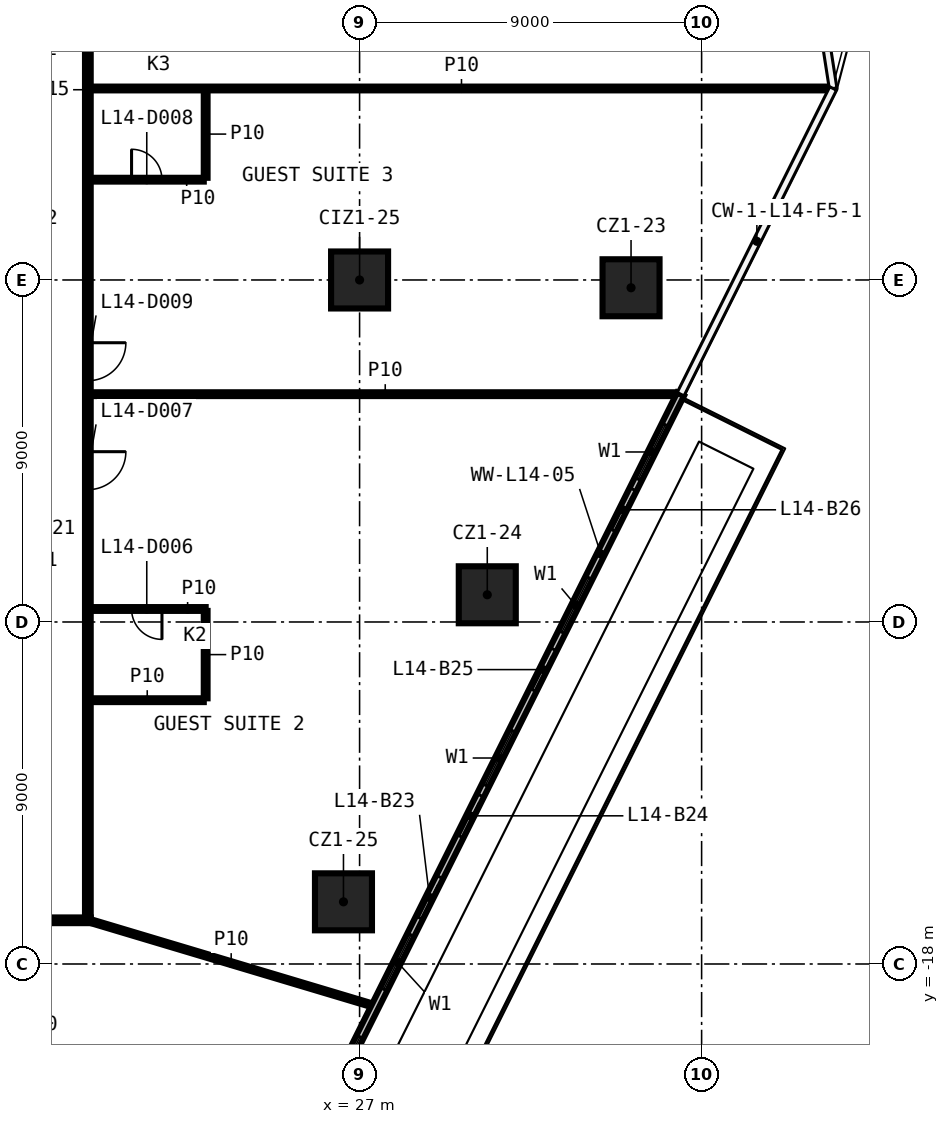
"""IFC4 building model, lengths in metres.
Left out: names, types, materials, properties, quantities, classifications, styles, units other than length and angle.
Written with IfcOpenShell. Run it as: python <this file> out.ifc"""

import sys

from ifc_helpers import new_model, si_unit, direction, frame, frame_2d, origin, origin_2d, place, context, subcontext, project, spatial, rectangle, extrude, element, fill, save


model = new_model("IFC4")
c1 = context("Model", 3, precision=1e-05, world=origin(), true_north=direction((0.0, 1.0)))
c2 = subcontext(c1, "Body", "Model", "MODEL_VIEW")
j1 = project(units=[si_unit("LENGTHUNIT", "METRE"), si_unit("PLANEANGLEUNIT", "RADIAN")], contexts=[c1])
p1 = place(None, origin())
s1 = spatial("IfcSite", under=j1, at=p1, CompositionType="ELEMENT")
p2 = place(p1, origin())
s2 = spatial("IfcBuilding", under=s1, at=p2, CompositionType="ELEMENT")
p3 = place(p2, frame((0.0, 0.0, 73.6)))
s3 = spatial("IfcBuildingStorey", under=s2, at=p3, CompositionType="ELEMENT", Elevation=73.6)
for number, where, z_axis, x_axis in (
    (1, (34.143, -0.205, 0.0), (0.0, 0.0, 1.0), (1.0, 0.0, 0.0)),
    (2, (30.36, -8.284, 0.0), (0.0, 0.0, 1.0), (1.0, 0.0, 0.0)),
    (3, (26.576, -16.364, 0.0), (0.0, 0.0, 1.0), (1.0, 0.0, 0.0)),
    (4, (27.0, 0.0, 0.0), (0.0, 0.0, 1.0), (1.0, 0.0, 0.0)),
):
    element("IfcColumn", number, at=place(p3, frame(where, z_axis=z_axis, x_axis=x_axis)), inside=s3, PredefinedType="COLUMN", context=c2, shape_type="SweptSolid", body=[
        extrude(rectangle(XDim=1.5, YDim=1.5, at=origin_2d()), origin(), (0.0, 0.0, 1.0), 3.3),
    ])
p4 = place(p3, frame((19.925, -16.85, 0.0), z_axis=(0.0, 0.0, 1.0), x_axis=(-1.0, 0.0, 0.0)))
e5 = element("IfcWall", 5, at=p4, inside=s3, PredefinedType="PARTITIONING", context=c2, shape_type="SweptSolid", body=[
    extrude(rectangle(XDim=39.85, YDim=0.15, at=frame_2d((19.925, 0.0))), origin(), (0.0, 0.0, 1.0), 3.3),
])
p5 = place(p4, frame((30.959, 0.0, 0.0)))
e6 = element("IfcOpeningElement", 6, at=p5, cuts=e5, PredefinedType="OPENING", context=c2, shape_type="SweptSolid", body=[
    extrude(rectangle(XDim=0.9, YDim=2.1, at=frame_2d((0.45, 1.05))), frame((0.0, 0.085, 0.0), z_axis=(0.0, -1.0, 0.0), x_axis=(1.0, 0.0, 0.0)), (0.0, 0.0, 1.0), 0.17),
])
p6 = place(p4, frame((22.077, 0.0, 0.0)))
e7 = element("IfcOpeningElement", 7, at=p6, cuts=e5, PredefinedType="OPENING", context=c2, shape_type="SweptSolid", body=[
    extrude(rectangle(XDim=0.9, YDim=2.1, at=frame_2d((0.45, 1.05))), frame((0.0, 0.085, 0.0), z_axis=(0.0, -1.0, 0.0), x_axis=(1.0, 0.0, 0.0)), (0.0, 0.0, 1.0), 0.17),
])
p7 = place(p3, frame((19.925, -11.058, 0.0), z_axis=(0.0, 0.0, 1.0), x_axis=(1.0, 0.0, 0.0)))
e8 = element("IfcWall", 8, at=p7, inside=s3, PredefinedType="PARTITIONING", context=c2, shape_type="SweptSolid", body=[
    extrude(rectangle(XDim=2.975, YDim=0.1, at=frame_2d((1.487, 0.0))), origin(), (0.0, 0.0, 1.0), 3.3),
])
p8 = place(p3, frame((22.95, -8.658, 0.0), z_axis=(0.0, 0.0, 1.0), x_axis=(-1.0, 0.0, 0.0)))
e9 = element("IfcWall", 9, at=p8, inside=s3, PredefinedType="PARTITIONING", context=c2, shape_type="SweptSolid", body=[
    extrude(rectangle(XDim=3.025, YDim=0.1, at=frame_2d((1.512, 0.0))), origin(), (0.0, 0.0, 1.0), 3.3),
])
p9 = place(p8, frame((1.15, 0.0, 0.0)))
e10 = element("IfcOpeningElement", 10, at=p9, cuts=e9, PredefinedType="OPENING", context=c2, shape_type="SweptSolid", body=[
    extrude(rectangle(XDim=0.8, YDim=2.1, at=frame_2d((0.4, 1.05))), frame((0.0, 0.06, 0.0), z_axis=(0.0, -1.0, 0.0), x_axis=(1.0, 0.0, 0.0)), (0.0, 0.0, 1.0), 0.12),
])
p10 = place(p3, frame((19.925, -3.005, 0.0), z_axis=(0.0, 0.0, 1.0), x_axis=(1.0, 0.0, 0.0)))
e11 = element("IfcWall", 11, at=p10, inside=s3, PredefinedType="PARTITIONING", context=c2, shape_type="SweptSolid", body=[
    extrude(rectangle(XDim=15.5, YDim=0.1, at=frame_2d((7.75, 0.0))), origin(), (0.0, 0.0, 1.0), 3.3),
])
p11 = place(p3, frame((19.925, 2.639, 0.0), z_axis=(0.0, 0.0, 1.0), x_axis=(1.0, 0.0, 0.0)))
e12 = element("IfcWall", 12, at=p11, inside=s3, PredefinedType="PARTITIONING", context=c2, shape_type="SweptSolid", body=[
    extrude(rectangle(XDim=2.975, YDim=0.1, at=frame_2d((1.487, 0.0))), origin(), (0.0, 0.0, 1.0), 3.3),
])
p12 = place(p11, frame((1.075, 0.0, 0.0)))
e13 = element("IfcOpeningElement", 13, at=p12, cuts=e12, PredefinedType="OPENING", context=c2, shape_type="SweptSolid", body=[
    extrude(rectangle(XDim=0.8, YDim=2.1, at=frame_2d((0.4, 1.05))), frame((0.0, 0.06, 0.0), z_axis=(0.0, -1.0, 0.0), x_axis=(1.0, 0.0, 0.0)), (0.0, 0.0, 1.0), 0.12),
])
p13 = place(p3, frame((19.925, 5.039, 0.0), z_axis=(0.0, 0.0, 1.0), x_axis=(1.0, 0.0, 0.0)))
e14 = element("IfcWall", 14, at=p13, inside=s3, PredefinedType="PARTITIONING", context=c2, shape_type="SweptSolid", body=[
    extrude(rectangle(XDim=19.513, YDim=0.1, at=frame_2d((9.757, 0.0))), origin(), (0.0, 0.0, 1.0), 3.3),
])
for number, where, z_axis, x_axis in (
    (15, (22.95, -11.009, 0.0), (0.0, 0.0, 1.0), (0.0, 1.0, 0.0)),
    (16, (22.95, 2.689, 0.0), (0.0, 0.0, 1.0), (0.0, 1.0, 0.0)),
):
    element("IfcWall", number, at=place(p3, frame(where, z_axis=z_axis, x_axis=x_axis)), inside=s3, PredefinedType="PARTITIONING", context=c2, shape_type="SweptSolid", body=[
        extrude(rectangle(XDim=2.3, YDim=0.1, at=frame_2d((1.15, 0.0))), origin(), (0.0, 0.0, 1.0), 3.3),
    ])
p14 = place(p3, frame((19.85, 16.775, 0.0), z_axis=(0.0, 0.0, 1.0), x_axis=(0.0, -1.0, 0.0)))
e17 = element("IfcWall", 17, at=p14, inside=s3, PredefinedType="PARTITIONING", context=c2, shape_type="SweptSolid", body=[
    extrude(rectangle(XDim=33.55, YDim=0.15, at=frame_2d((16.775, 0.0))), origin(), (0.0, 0.0, 1.0), 3.3),
])
p15 = place(p14, frame((21.293, 0.0, 0.0)))
e18 = element("IfcOpeningElement", 18, at=p15, cuts=e17, PredefinedType="OPENING", context=c2, shape_type="SweptSolid", body=[
    extrude(rectangle(XDim=1.0, YDim=2.1, at=frame_2d((0.5, 1.05))), frame((0.0, 0.085, 0.0), z_axis=(0.0, -1.0, 0.0), x_axis=(1.0, 0.0, 0.0)), (0.0, 0.0, 1.0), 0.17),
])
p16 = place(p14, frame((18.427, 0.0, 0.0)))
e19 = element("IfcOpeningElement", 19, at=p16, cuts=e17, PredefinedType="OPENING", context=c2, shape_type="SweptSolid", body=[
    extrude(rectangle(XDim=1.0, YDim=2.1, at=frame_2d((0.5, 1.05))), frame((0.0, 0.085, 0.0), z_axis=(0.0, -1.0, 0.0), x_axis=(1.0, 0.0, 0.0)), (0.0, 0.0, 1.0), 0.17),
])
p17 = place(p14, frame((4.211, 0.0, 0.0)))
e20 = element("IfcOpeningElement", 20, at=p17, cuts=e17, PredefinedType="OPENING", context=c2, shape_type="SweptSolid", body=[
    extrude(rectangle(XDim=0.9, YDim=2.1, at=frame_2d((0.45, 1.05))), frame((0.0, 0.085, 0.0), z_axis=(0.0, -1.0, 0.0), x_axis=(1.0, 0.0, 0.0)), (0.0, 0.0, 1.0), 0.17),
])
p18 = place(p3, frame((19.85, -16.85, 0.0), z_axis=(0.0, 0.0, 1.0), x_axis=(0.958075156501, -0.286517005597, 0.0)))
e21 = element("IfcWall", 21, at=p18, inside=s3, PredefinedType="PARTITIONING", context=c2, shape_type="SweptSolid", body=[
    extrude(rectangle(XDim=7.873, YDim=0.1, at=frame_2d((3.936, 0.0))), origin(), (0.0, 0.0, 1.0), 3.3),
])
p19 = place(p3, frame((23.394, -27.165, 0.0), z_axis=(0.0, 0.0, 1.0), x_axis=(0.446421309396, 0.894822895615, 0.0)))
e22 = element("IfcWall", 22, at=p19, inside=s3, PredefinedType="SOLIDWALL", context=c2, shape_type="SweptSolid", body=[
    extrude(rectangle(XDim=27.0, YDim=0.2, at=frame_2d((13.5, 0.0))), origin(), (0.0, 0.0, 1.0), 3.3),
])
p20 = place(p19, frame((0.5, 0.0, 0.6)))
e23 = element("IfcOpeningElement", 23, at=p20, cuts=e22, PredefinedType="OPENING", context=c2, shape_type="SweptSolid", body=[
    extrude(rectangle(XDim=1.6, YDim=2.4, at=frame_2d((0.8, 1.2))), frame((0.0, 0.11, 0.0), z_axis=(0.0, -1.0, 0.0), x_axis=(1.0, 0.0, 0.0)), (0.0, 0.0, 1.0), 0.22),
])
p21 = place(p19, frame((3.0, 0.0, 0.0)))
e24 = element("IfcOpeningElement", 24, at=p21, cuts=e22, PredefinedType="OPENING", context=c2, shape_type="SweptSolid", body=[
    extrude(rectangle(XDim=1.2, YDim=2.4, at=frame_2d((0.6, 1.2))), frame((0.0, 0.11, 0.0), z_axis=(0.0, -1.0, 0.0), x_axis=(1.0, 0.0, 0.0)), (0.0, 0.0, 1.0), 0.22),
])
p22 = place(p19, frame((6.5, 0.0, 0.6)))
e25 = element("IfcOpeningElement", 25, at=p22, cuts=e22, PredefinedType="OPENING", context=c2, shape_type="SweptSolid", body=[
    extrude(rectangle(XDim=1.6, YDim=2.4, at=frame_2d((0.8, 1.2))), frame((0.0, 0.11, 0.0), z_axis=(0.0, -1.0, 0.0), x_axis=(1.0, 0.0, 0.0)), (0.0, 0.0, 1.0), 0.22),
])
p23 = place(p19, frame((5.0, 0.0, 0.0)))
e26 = element("IfcOpeningElement", 26, at=p23, cuts=e22, PredefinedType="OPENING", context=c2, shape_type="SweptSolid", body=[
    extrude(rectangle(XDim=1.2, YDim=2.4, at=frame_2d((0.6, 1.2))), frame((0.0, 0.11, 0.0), z_axis=(0.0, -1.0, 0.0), x_axis=(1.0, 0.0, 0.0)), (0.0, 0.0, 1.0), 0.22),
])
p24 = place(p19, frame((9.5, 0.0, 0.6)))
e27 = element("IfcOpeningElement", 27, at=p24, cuts=e22, PredefinedType="OPENING", context=c2, shape_type="SweptSolid", body=[
    extrude(rectangle(XDim=1.6, YDim=2.4, at=frame_2d((0.8, 1.2))), frame((0.0, 0.11, 0.0), z_axis=(0.0, -1.0, 0.0), x_axis=(1.0, 0.0, 0.0)), (0.0, 0.0, 1.0), 0.22),
])
p25 = place(p19, frame((11.6, 0.0, 0.0)))
e28 = element("IfcOpeningElement", 28, at=p25, cuts=e22, PredefinedType="OPENING", context=c2, shape_type="SweptSolid", body=[
    extrude(rectangle(XDim=1.2, YDim=2.4, at=frame_2d((0.6, 1.2))), frame((0.0, 0.11, 0.0), z_axis=(0.0, -1.0, 0.0), x_axis=(1.0, 0.0, 0.0)), (0.0, 0.0, 1.0), 0.22),
])
p26 = place(p19, frame((15.5, 0.0, 0.6)))
e29 = element("IfcOpeningElement", 29, at=p26, cuts=e22, PredefinedType="OPENING", context=c2, shape_type="SweptSolid", body=[
    extrude(rectangle(XDim=1.6, YDim=2.4, at=frame_2d((0.8, 1.2))), frame((0.0, 0.11, 0.0), z_axis=(0.0, -1.0, 0.0), x_axis=(1.0, 0.0, 0.0)), (0.0, 0.0, 1.0), 0.22),
])
p27 = place(p19, frame((14.0, 0.0, 0.0)))
e30 = element("IfcOpeningElement", 30, at=p27, cuts=e22, PredefinedType="OPENING", context=c2, shape_type="SweptSolid", body=[
    extrude(rectangle(XDim=1.2, YDim=2.4, at=frame_2d((0.6, 1.2))), frame((0.0, 0.11, 0.0), z_axis=(0.0, -1.0, 0.0), x_axis=(1.0, 0.0, 0.0)), (0.0, 0.0, 1.0), 0.22),
])
p28 = place(p19, frame((20.0, 0.0, 0.6)))
e31 = element("IfcOpeningElement", 31, at=p28, cuts=e22, PredefinedType="OPENING", context=c2, shape_type="SweptSolid", body=[
    extrude(rectangle(XDim=1.6, YDim=2.4, at=frame_2d((0.8, 1.2))), frame((0.0, 0.11, 0.0), z_axis=(0.0, -1.0, 0.0), x_axis=(1.0, 0.0, 0.0)), (0.0, 0.0, 1.0), 0.22),
])
p29 = place(p19, frame((18.3, 0.0, 0.0)))
e32 = element("IfcOpeningElement", 32, at=p29, cuts=e22, PredefinedType="OPENING", context=c2, shape_type="SweptSolid", body=[
    extrude(rectangle(XDim=1.2, YDim=2.4, at=frame_2d((0.6, 1.2))), frame((0.0, 0.11, 0.0), z_axis=(0.0, -1.0, 0.0), x_axis=(1.0, 0.0, 0.0)), (0.0, 0.0, 1.0), 0.22),
])
p30 = place(p19, frame((24.5, 0.0, 0.6)))
e33 = element("IfcOpeningElement", 33, at=p30, cuts=e22, PredefinedType="OPENING", context=c2, shape_type="SweptSolid", body=[
    extrude(rectangle(XDim=1.6, YDim=2.4, at=frame_2d((0.8, 1.2))), frame((0.0, 0.11, 0.0), z_axis=(0.0, -1.0, 0.0), x_axis=(1.0, 0.0, 0.0)), (0.0, 0.0, 1.0), 0.22),
])
p31 = place(p19, frame((23.0, 0.0, 0.0)))
e34 = element("IfcOpeningElement", 34, at=p31, cuts=e22, PredefinedType="OPENING", context=c2, shape_type="SweptSolid", body=[
    extrude(rectangle(XDim=1.2, YDim=2.4, at=frame_2d((0.6, 1.2))), frame((0.0, 0.11, 0.0), z_axis=(0.0, -1.0, 0.0), x_axis=(1.0, 0.0, 0.0)), (0.0, 0.0, 1.0), 0.22),
])
p32 = place(p9, origin())
e35 = element("IfcDoor", 35, at=p32, inside=s3, OperationType="SINGLE_SWING_LEFT", PredefinedType="DOOR", context=c2, shape_type="SweptSolid", body=[
    extrude(rectangle(XDim=0.8, YDim=2.1, at=frame_2d((0.4, 1.05))), frame((0.0, 0.025, 0.0), z_axis=(0.0, -1.0, 0.0), x_axis=(1.0, 0.0, 0.0)), (0.0, 0.0, 1.0), 0.05),
])
fill(e10, e35)
p33 = place(p15, origin())
e36 = element("IfcDoor", 36, at=p33, inside=s3, OperationType="SINGLE_SWING_RIGHT", PredefinedType="DOOR", context=c2, shape_type="SweptSolid", body=[
    extrude(rectangle(XDim=1.0, YDim=2.1, at=frame_2d((0.5, 1.05))), frame((0.0, 0.025, 0.0), z_axis=(0.0, -1.0, 0.0), x_axis=(1.0, 0.0, 0.0)), (0.0, 0.0, 1.0), 0.05),
])
fill(e18, e36)
p34 = place(p12, origin())
e37 = element("IfcDoor", 37, at=p34, inside=s3, OperationType="SINGLE_SWING_RIGHT", PredefinedType="DOOR", context=c2, shape_type="SweptSolid", body=[
    extrude(rectangle(XDim=0.8, YDim=2.1, at=frame_2d((0.4, 1.05))), frame((0.0, 0.025, 0.0), z_axis=(0.0, -1.0, 0.0), x_axis=(1.0, 0.0, 0.0)), (0.0, 0.0, 1.0), 0.05),
])
fill(e13, e37)
p35 = place(p16, origin())
e38 = element("IfcDoor", 38, at=p35, inside=s3, OperationType="SINGLE_SWING_LEFT", PredefinedType="DOOR", context=c2, shape_type="SweptSolid", body=[
    extrude(rectangle(XDim=1.0, YDim=2.1, at=frame_2d((0.5, 1.05))), frame((0.0, 0.025, 0.0), z_axis=(0.0, -1.0, 0.0), x_axis=(1.0, 0.0, 0.0)), (0.0, 0.0, 1.0), 0.05),
])
fill(e19, e38)
p36 = place(p22, origin())
e39 = element("IfcWindow", 39, at=p36, inside=s3, PartitioningType="SINGLE_PANEL", PredefinedType="WINDOW", context=c2, shape_type="SweptSolid", body=[
    extrude(rectangle(XDim=1.6, YDim=2.4, at=frame_2d((0.8, 1.2))), frame((0.0, 0.03, 0.0), z_axis=(0.0, -1.0, 0.0), x_axis=(1.0, 0.0, 0.0)), (0.0, 0.0, 1.0), 0.06),
])
fill(e25, e39)
p37 = place(p24, origin())
e40 = element("IfcWindow", 40, at=p37, inside=s3, PartitioningType="SINGLE_PANEL", PredefinedType="WINDOW", context=c2, shape_type="SweptSolid", body=[
    extrude(rectangle(XDim=1.6, YDim=2.4, at=frame_2d((0.8, 1.2))), frame((0.0, 0.03, 0.0), z_axis=(0.0, -1.0, 0.0), x_axis=(1.0, 0.0, 0.0)), (0.0, 0.0, 1.0), 0.06),
])
fill(e27, e40)
p38 = place(p25, origin())
e41 = element("IfcDoor", 41, at=p38, inside=s3, OperationType="SLIDING_TO_LEFT", PredefinedType="DOOR", context=c2, shape_type="SweptSolid", body=[
    extrude(rectangle(XDim=1.2, YDim=2.4, at=frame_2d((0.6, 1.2))), frame((0.0, 0.025, 0.0), z_axis=(0.0, -1.0, 0.0), x_axis=(1.0, 0.0, 0.0)), (0.0, 0.0, 1.0), 0.05),
])
fill(e28, e41)
p39 = place(p26, origin())
e42 = element("IfcWindow", 42, at=p39, inside=s3, PartitioningType="SINGLE_PANEL", PredefinedType="WINDOW", context=c2, shape_type="SweptSolid", body=[
    extrude(rectangle(XDim=1.6, YDim=2.4, at=frame_2d((0.8, 1.2))), frame((0.0, 0.03, 0.0), z_axis=(0.0, -1.0, 0.0), x_axis=(1.0, 0.0, 0.0)), (0.0, 0.0, 1.0), 0.06),
])
fill(e29, e42)
p40 = place(p27, origin())
e43 = element("IfcDoor", 43, at=p40, inside=s3, OperationType="SLIDING_TO_LEFT", PredefinedType="DOOR", context=c2, shape_type="SweptSolid", body=[
    extrude(rectangle(XDim=1.2, YDim=2.4, at=frame_2d((0.6, 1.2))), frame((0.0, 0.025, 0.0), z_axis=(0.0, -1.0, 0.0), x_axis=(1.0, 0.0, 0.0)), (0.0, 0.0, 1.0), 0.05),
])
fill(e30, e43)
p41 = place(p28, origin())
e44 = element("IfcWindow", 44, at=p41, inside=s3, PartitioningType="SINGLE_PANEL", PredefinedType="WINDOW", context=c2, shape_type="SweptSolid", body=[
    extrude(rectangle(XDim=1.6, YDim=2.4, at=frame_2d((0.8, 1.2))), frame((0.0, 0.03, 0.0), z_axis=(0.0, -1.0, 0.0), x_axis=(1.0, 0.0, 0.0)), (0.0, 0.0, 1.0), 0.06),
])
fill(e31, e44)
p42 = place(p29, origin())
e45 = element("IfcDoor", 45, at=p42, inside=s3, OperationType="SLIDING_TO_LEFT", PredefinedType="DOOR", context=c2, shape_type="SweptSolid", body=[
    extrude(rectangle(XDim=1.2, YDim=2.4, at=frame_2d((0.6, 1.2))), frame((0.0, 0.025, 0.0), z_axis=(0.0, -1.0, 0.0), x_axis=(1.0, 0.0, 0.0)), (0.0, 0.0, 1.0), 0.05),
])
fill(e32, e45)
p43 = place(p30, origin())
e46 = element("IfcWindow", 46, at=p43, inside=s3, PartitioningType="SINGLE_PANEL", PredefinedType="WINDOW", context=c2, shape_type="SweptSolid", body=[
    extrude(rectangle(XDim=1.6, YDim=2.4, at=frame_2d((0.8, 1.2))), frame((0.0, 0.03, 0.0), z_axis=(0.0, -1.0, 0.0), x_axis=(1.0, 0.0, 0.0)), (0.0, 0.0, 1.0), 0.06),
])
fill(e33, e46)
p44 = place(p31, origin())
e47 = element("IfcDoor", 47, at=p44, inside=s3, OperationType="SLIDING_TO_LEFT", PredefinedType="DOOR", context=c2, shape_type="SweptSolid", body=[
    extrude(rectangle(XDim=1.2, YDim=2.4, at=frame_2d((0.6, 1.2))), frame((0.0, 0.025, 0.0), z_axis=(0.0, -1.0, 0.0), x_axis=(1.0, 0.0, 0.0)), (0.0, 0.0, 1.0), 0.05),
])
fill(e34, e47)
save(model, sys.argv[1])
